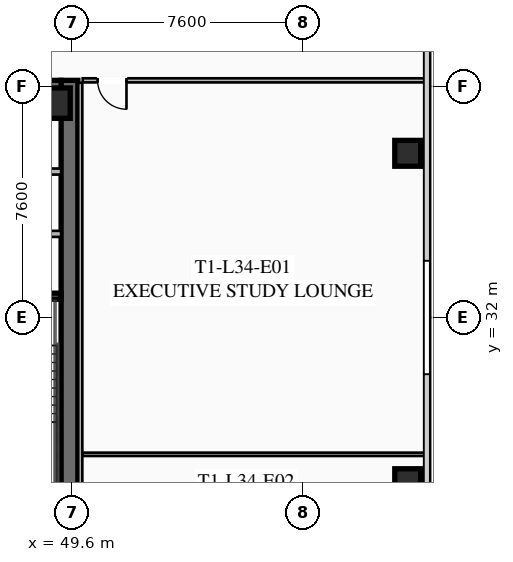
"""IFC4 building model, lengths in metres.
Left out: names, types, materials, properties, quantities, classifications, styles, units other than length and angle.
Written with IfcOpenShell. Run it as: python <this file> out.ifc"""

import sys

from ifc_helpers import new_model, si_unit, direction, frame, frame_2d, origin, origin_2d, place, context, subcontext, project, spatial, rectangle, hollow_rectangle, extrude, element, fill, save


model = new_model("IFC4")
c1 = context("Model", 3, precision=1e-05, world=origin(), true_north=direction((0.0, 1.0)))
c2 = subcontext(c1, "Body", "Model", "MODEL_VIEW")
j1 = project(units=[si_unit("LENGTHUNIT", "METRE"), si_unit("PLANEANGLEUNIT", "RADIAN")], contexts=[c1])
p1 = place(None, origin())
s1 = spatial("IfcSite", under=j1, at=p1, CompositionType="ELEMENT")
p2 = place(p1, origin())
s2 = spatial("IfcBuilding", under=s1, at=p2, CompositionType="ELEMENT")
p3 = place(p2, frame((0.0, 0.0, 128.6)))
s3 = spatial("IfcBuildingStorey", under=s2, at=p3, CompositionType="ELEMENT", Elevation=128.6)
p4 = place(p3, frame((49.525, 39.8, 0.0), z_axis=(0.0, 0.0, 1.0), x_axis=(0.0, -1.0, 0.0)))
e1 = element("IfcWall", 1, at=p4, inside=s3, PredefinedType="SHEAR", context=c2, shape_type="SweptSolid", body=[
    extrude(rectangle(XDim=15.6, YDim=0.55, at=frame_2d((7.8, 0.0))), origin(), (0.0, 0.0, 1.0), 3.55),
])
p5 = place(p3, frame((34.75, 39.525, 0.0), z_axis=(0.0, 0.0, 1.0), x_axis=(1.0, 0.0, 0.0)))
e2 = element("IfcWall", 2, at=p5, inside=s3, PredefinedType="SHEAR", context=c2, shape_type="SweptSolid", body=[
    extrude(rectangle(XDim=14.5, YDim=0.55, at=frame_2d((7.25, 0.0))), origin(), (0.0, 0.0, 1.0), 3.55),
])
p6 = place(p5, frame((4.3, 0.0, 0.0)))
e3 = element("IfcOpeningElement", 3, at=p6, cuts=e2, PredefinedType="OPENING", context=c2, shape_type="SweptSolid", body=[
    extrude(rectangle(XDim=1.25, YDim=2.25, at=frame_2d((0.625, 1.125))), frame((0.0, 0.285, 0.0), z_axis=(0.0, -1.0, 0.0), x_axis=(1.0, 0.0, 0.0)), (0.0, 0.0, 1.0), 0.57),
])
p7 = place(p5, frame((9.35, 0.0, 0.0)))
e4 = element("IfcOpeningElement", 4, at=p7, cuts=e2, PredefinedType="OPENING", context=c2, shape_type="SweptSolid", body=[
    extrude(rectangle(XDim=1.25, YDim=2.25, at=frame_2d((0.625, 1.125))), frame((0.0, 0.285, 0.0), z_axis=(0.0, -1.0, 0.0), x_axis=(1.0, 0.0, 0.0)), (0.0, 0.0, 1.0), 0.57),
])
p8 = place(p3, frame((49.05, 39.05, 0.0), z_axis=(0.0, 0.0, 1.0), x_axis=(1.0, 0.0, 0.0)))
e5 = element("IfcColumn", 5, at=p8, inside=s3, PredefinedType="COLUMN", context=c2, shape_type="SweptSolid", body=[
    extrude(hollow_rectangle(XDim=1.0, YDim=1.0, WallThickness=0.04, at=origin_2d()), origin(), (0.0, 0.0, 1.0), 3.37),
])
for number, where, z_axis, x_axis in (
    (6, (60.65, 26.6, 0.0), (0.0, 0.0, 1.0), (1.0, 0.0, 0.0)),
    (7, (60.65, 37.4, 0.0), (0.0, 0.0, 1.0), (1.0, 0.0, 0.0)),
):
    element("IfcColumn", number, at=place(p3, frame(where, z_axis=z_axis, x_axis=x_axis)), inside=s3, PredefinedType="COLUMN", context=c2, shape_type="SweptSolid", body=[
        extrude(hollow_rectangle(XDim=0.85, YDim=0.85, WallThickness=0.035, at=origin_2d()), origin(), (0.0, 0.0, 1.0), 3.37),
    ])
p9 = place(p3, frame((45.7, 32.7, 0.0), z_axis=(0.0, 0.0, 1.0), x_axis=(1.0, 0.0, 0.0)))
e8 = element("IfcWall", 8, at=p9, inside=s3, PredefinedType="SHEAR", context=c2, shape_type="SweptSolid", body=[
    extrude(rectangle(XDim=3.55, YDim=0.2, at=frame_2d((1.775, 0.0))), origin(), (0.0, 0.0, 1.0), 3.37),
])
for number, where, z_axis, x_axis in (
    (9, (46.05, 34.75, 0.0), (0.0, 0.0, 1.0), (1.0, 0.0, 0.0)),
    (10, (46.05, 36.8, 0.0), (0.0, 0.0, 1.0), (1.0, 0.0, 0.0)),
):
    element("IfcWall", number, at=place(p3, frame(where, z_axis=z_axis, x_axis=x_axis)), inside=s3, PredefinedType="SOLIDWALL", context=c2, shape_type="SweptSolid", body=[
        extrude(rectangle(XDim=3.2, YDim=0.2, at=frame_2d((1.6, 0.0))), origin(), (0.0, 0.0, 1.0), 3.37),
    ])
p10 = place(p3, frame((49.88, 39.72, 0.0), z_axis=(0.0, 0.0, 1.0), x_axis=(0.0, -1.0, 0.0)))
e11 = element("IfcWall", 11, at=p10, inside=s3, PredefinedType="PARTITIONING", context=c2, shape_type="SweptSolid", body=[
    extrude(rectangle(XDim=15.44, YDim=0.135, at=frame_2d((7.72, 0.0))), origin(), (0.0, 0.0, 1.0), 2.723),
])
p11 = place(p3, frame((61.28, 39.8, 0.0), z_axis=(0.0, 0.0, 1.0), x_axis=(-1.0, 0.0, 0.0)))
e12 = element("IfcWall", 12, at=p11, inside=s3, PredefinedType="PARTITIONING", context=c2, shape_type="SweptSolid", body=[
    extrude(rectangle(XDim=11.32, YDim=0.135, at=frame_2d((5.66, 0.0))), origin(), (0.0, 0.0, 1.0), 2.723),
])
p12 = place(p11, frame((9.88, 0.0, 0.0)))
e13 = element("IfcOpeningElement", 13, at=p12, cuts=e12, PredefinedType="OPENING", context=c2, shape_type="SweptSolid", body=[
    extrude(rectangle(XDim=0.95, YDim=2.05, at=frame_2d((0.475, 1.025))), frame((0.0, 0.077, 0.0), z_axis=(0.0, -1.0, 0.0), x_axis=(1.0, 0.0, 0.0)), (0.0, 0.0, 1.0), 0.155),
])
p13 = place(p3, frame((49.96, 27.5, 0.0), z_axis=(0.0, 0.0, 1.0), x_axis=(1.0, 0.0, 0.0)))
e14 = element("IfcWall", 14, at=p13, inside=s3, PredefinedType="PARTITIONING", context=c2, shape_type="SweptSolid", body=[
    extrude(rectangle(XDim=11.32, YDim=0.11, at=frame_2d((5.66, 0.0))), origin(), (0.0, 0.0, 1.0), 2.723),
])
p14 = place(p12, origin())
e15 = element("IfcDoor", 15, at=p14, inside=s3, OperationType="SINGLE_SWING_LEFT", PredefinedType="DOOR", context=c2, shape_type="SweptSolid", body=[
    extrude(rectangle(XDim=0.95, YDim=2.05, at=frame_2d((0.475, 1.025))), frame((0.0, 0.025, 0.0), z_axis=(0.0, -1.0, 0.0), x_axis=(1.0, 0.0, 0.0)), (0.0, 0.0, 1.0), 0.05),
])
fill(e13, e15)
save(model, sys.argv[1])
